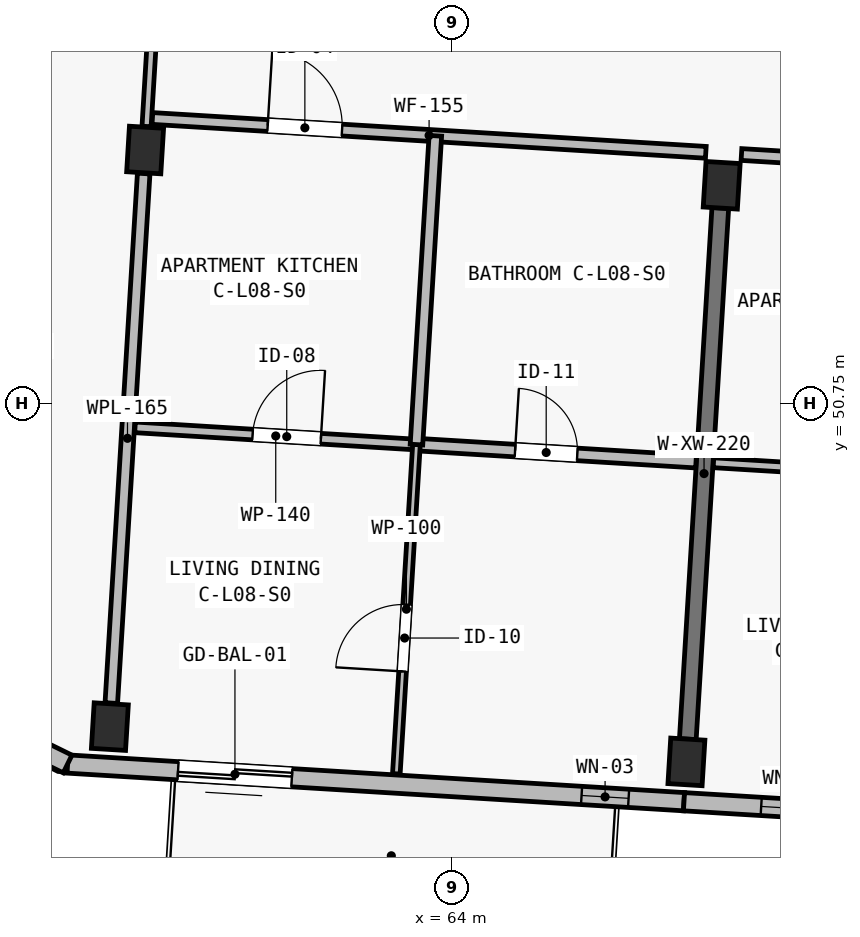
"""IFC4 building model, lengths in metres.
Left out: names, types, materials, properties, quantities, classifications, styles, units other than length and angle.
Written with IfcOpenShell. Run it as: python <this file> out.ifc"""

import sys

from ifc_helpers import new_model, si_unit, direction, frame, frame_2d, origin, origin_2d, place, context, subcontext, project, spatial, rectangle, extrude, element, fill, save


model = new_model("IFC4")
c1 = context("Model", 3, precision=1e-05, world=origin(), true_north=direction((0.0, 1.0)))
c2 = subcontext(c1, "Body", "Model", "MODEL_VIEW")
j1 = project(units=[si_unit("LENGTHUNIT", "METRE"), si_unit("PLANEANGLEUNIT", "RADIAN")], contexts=[c1])
p1 = place(None, origin())
s1 = spatial("IfcSite", under=j1, at=p1, CompositionType="ELEMENT")
p2 = place(p1, origin())
s2 = spatial("IfcBuilding", under=s1, at=p2, CompositionType="ELEMENT")
p3 = place(p2, frame((0.0, 0.0, 27.9)))
s3 = spatial("IfcBuildingStorey", under=s2, at=p3, CompositionType="ELEMENT", Elevation=27.9)
for number, where, z_axis, x_axis in (
    (1, (59.5, 46.5, 0.0), (0.0, 0.0, 1.0), (0.998, -0.061, 0.0)),
    (2, (59.964, 54.086, 0.0), (0.0, 0.0, 1.0), (0.998, -0.061, 0.0)),
    (3, (67.086, 46.036, 0.0), (0.0, 0.0, 1.0), (0.998, -0.061, 0.0)),
    (4, (67.55, 53.622, 0.0), (0.0, 0.0, 1.0), (0.998, -0.061, 0.0)),
):
    element("IfcColumn", number, at=place(p3, frame(where, z_axis=z_axis, x_axis=x_axis)), inside=s3, PredefinedType="COLUMN", context=c2, shape_type="SweptSolid", body=[
        extrude(rectangle(XDim=0.45, YDim=0.6, at=origin_2d()), origin(), (0.0, 0.0, 1.0), 3.25),
    ])
p4 = place(p3, frame((67.104, 46.335, 0.0), z_axis=(0.0, 0.0, 1.0), x_axis=(0.061034188237, 0.998135676081, 0.0)))
e5 = element("IfcWall", 5, at=p4, inside=s3, PredefinedType="SHEAR", context=c2, shape_type="SweptSolid", body=[
    extrude(rectangle(XDim=7.0, YDim=0.22, at=frame_2d((3.5, 0.0))), origin(), (0.0, 0.0, 1.0), 2.5),
])
p5 = place(p3, frame((67.054, 45.512, 0.0), z_axis=(0.0, 0.0, 1.0), x_axis=(-0.998134248939, 0.061057522844, 0.0)))
e6 = element("IfcWall", 6, at=p5, inside=s3, PredefinedType="SOLIDWALL", context=c2, shape_type="SweptSolid", body=[
    extrude(rectangle(XDim=8.125, YDim=0.24, at=frame_2d((4.062, 0.0))), origin(), (0.0, 0.0, 1.0), 3.0),
])
p6 = place(p5, frame((5.169, 0.0, 0.0)))
e7 = element("IfcOpeningElement", 7, at=p6, cuts=e6, PredefinedType="OPENING", context=c2, shape_type="SweptSolid", body=[
    extrude(rectangle(XDim=1.5, YDim=2.12, at=frame_2d((0.75, 1.06))), frame((0.0, 0.135, 0.0), z_axis=(0.0, -1.0, 0.0), x_axis=(1.0, 0.0, 0.0)), (0.0, 0.0, 1.0), 0.27),
])
p7 = place(p5, frame((0.73, 0.0, 0.5)))
e8 = element("IfcOpeningElement", 8, at=p7, cuts=e6, PredefinedType="OPENING", context=c2, shape_type="SweptSolid", body=[
    extrude(rectangle(XDim=0.62, YDim=2.28, at=frame_2d((0.31, 1.14))), frame((0.0, 0.135, 0.0), z_axis=(0.0, -1.0, 0.0), x_axis=(1.0, 0.0, 0.0)), (0.0, 0.0, 1.0), 0.27),
])
p8 = place(p3, frame((74.64, 45.048, 0.0), z_axis=(0.0, 0.0, 1.0), x_axis=(-0.998135669243, 0.061034300063, 0.0)))
e9 = element("IfcWall", 9, at=p8, inside=s3, PredefinedType="SOLIDWALL", context=c2, shape_type="SweptSolid", body=[
    extrude(rectangle(XDim=7.6, YDim=0.24, at=frame_2d((3.8, 0.0))), origin(), (0.0, 0.0, 1.0), 3.0),
])
p9 = place(p8, frame((1.189, 0.0, 0.42)))
e10 = element("IfcOpeningElement", 10, at=p9, cuts=e9, PredefinedType="OPENING", context=c2, shape_type="SweptSolid", body=[
    extrude(rectangle(XDim=0.74, YDim=2.26, at=frame_2d((0.37, 1.13))), frame((0.0, 0.135, 0.0), z_axis=(0.0, -1.0, 0.0), x_axis=(1.0, 0.0, 0.0)), (0.0, 0.0, 1.0), 0.27),
])
p10 = place(p8, frame((5.782, 0.0, 0.42)))
e11 = element("IfcOpeningElement", 11, at=p10, cuts=e9, PredefinedType="OPENING", context=c2, shape_type="SweptSolid", body=[
    extrude(rectangle(XDim=0.8, YDim=2.3, at=frame_2d((0.4, 1.15))), frame((0.0, 0.135, 0.0), z_axis=(0.0, -1.0, 0.0), x_axis=(1.0, 0.0, 0.0)), (0.0, 0.0, 1.0), 0.27),
])
p11 = place(p3, frame((58.944, 46.008, 0.0), z_axis=(0.0, 0.0, 1.0), x_axis=(-0.897775054318, 0.440454256246, 0.0)))
e12 = element("IfcWall", 12, at=p11, inside=s3, PredefinedType="SOLIDWALL", context=c2, shape_type="SweptSolid", body=[
    extrude(rectangle(XDim=8.12, YDim=0.26, at=frame_2d((4.06, 0.0))), origin(), (0.0, 0.0, 1.0), 3.0),
])
p12 = place(p11, frame((2.45, 0.0, 0.45)))
e13 = element("IfcOpeningElement", 13, at=p12, cuts=e12, PredefinedType="OPENING", context=c2, shape_type="SweptSolid", body=[
    extrude(rectangle(XDim=0.7, YDim=2.36, at=frame_2d((0.35, 1.18))), frame((0.0, 0.145, 0.0), z_axis=(0.0, -1.0, 0.0), x_axis=(1.0, 0.0, 0.0)), (0.0, 0.0, 1.0), 0.29),
])
p13 = place(p11, frame((4.83, 0.0, 0.52)))
e14 = element("IfcOpeningElement", 14, at=p13, cuts=e12, PredefinedType="OPENING", context=c2, shape_type="SweptSolid", body=[
    extrude(rectangle(XDim=0.84, YDim=2.28, at=frame_2d((0.42, 1.14))), frame((0.0, 0.145, 0.0), z_axis=(0.0, -1.0, 0.0), x_axis=(1.0, 0.0, 0.0)), (0.0, 0.0, 1.0), 0.29),
])
p14 = place(p3, frame((51.654, 49.585, 0.0), z_axis=(0.0, 0.0, 1.0), x_axis=(0.448621989068, 0.893721607059, 0.0)))
e15 = element("IfcWall", 15, at=p14, inside=s3, PredefinedType="SOLIDWALL", context=c2, shape_type="SweptSolid", body=[
    extrude(rectangle(XDim=19.061, YDim=0.26, at=frame_2d((9.53, 0.0))), origin(), (0.0, 0.0, 1.0), 3.0),
])
p15 = place(p14, frame((2.45, 0.0, 0.45)))
e16 = element("IfcOpeningElement", 16, at=p15, cuts=e15, PredefinedType="OPENING", context=c2, shape_type="SweptSolid", body=[
    extrude(rectangle(XDim=0.7, YDim=2.36, at=frame_2d((0.35, 1.18))), frame((0.0, 0.145, 0.0), z_axis=(0.0, -1.0, 0.0), x_axis=(1.0, 0.0, 0.0)), (0.0, 0.0, 1.0), 0.29),
])
p16 = place(p14, frame((15.771, 0.0, 0.52)))
e17 = element("IfcOpeningElement", 17, at=p16, cuts=e15, PredefinedType="OPENING", context=c2, shape_type="SweptSolid", body=[
    extrude(rectangle(XDim=0.84, YDim=2.28, at=frame_2d((0.42, 1.14))), frame((0.0, 0.145, 0.0), z_axis=(0.0, -1.0, 0.0), x_axis=(1.0, 0.0, 0.0)), (0.0, 0.0, 1.0), 0.29),
])
p17 = place(p3, frame((59.983, 54.395, 0.0), z_axis=(0.0, 0.0, 1.0), x_axis=(0.061035211258, 0.998135613525, 0.0)))
e18 = element("IfcWall", 18, at=p17, inside=s3, PredefinedType="PARTITIONING", context=c2, shape_type="SweptSolid", body=[
    extrude(rectangle(XDim=3.78, YDim=0.12, at=frame_2d((1.89, 0.0))), origin(), (0.0, 0.0, 1.0), 2.5),
])
p18 = place(p17, frame((1.35, 0.0, 0.0)))
e19 = element("IfcOpeningElement", 19, at=p18, cuts=e18, PredefinedType="OPENING", context=c2, shape_type="SweptSolid", body=[
    extrude(rectangle(XDim=0.88, YDim=2.1, at=frame_2d((0.44, 1.05))), frame((0.0, 0.075, 0.0), z_axis=(0.0, -1.0, 0.0), x_axis=(1.0, 0.0, 0.0)), (0.0, 0.0, 1.0), 0.15),
])
p19 = place(p3, frame((59.519, 46.809, 0.0), z_axis=(0.0, 0.0, 1.0), x_axis=(0.061034681366, 0.998135645927, 0.0)))
e20 = element("IfcWall", 20, at=p19, inside=s3, PredefinedType="PLUMBINGWALL", context=c2, shape_type="SweptSolid", body=[
    extrude(rectangle(XDim=6.98, YDim=0.165, at=frame_2d((3.49, 0.0))), origin(), (0.0, 0.0, 1.0), 2.5),
])
p20 = place(p3, frame((60.06, 54.501, 0.0), z_axis=(0.0, 0.0, 1.0), x_axis=(0.998135030865, -0.061044739012, 0.0)))
e21 = element("IfcWall", 21, at=p20, inside=s3, PredefinedType="PARTITIONING", context=c2, shape_type="SweptSolid", body=[
    extrude(rectangle(XDim=7.295, YDim=0.155, at=frame_2d((3.647, 0.0))), origin(), (0.0, 0.0, 1.0), 2.97),
])
p21 = place(p20, frame((1.52, 0.0, 0.0)))
e22 = element("IfcOpeningElement", 22, at=p21, cuts=e21, PredefinedType="OPENING", context=c2, shape_type="SweptSolid", body=[
    extrude(rectangle(XDim=0.98, YDim=2.15, at=frame_2d((0.49, 1.075))), frame((0.0, 0.093, 0.0), z_axis=(0.0, -1.0, 0.0), x_axis=(1.0, 0.0, 0.0)), (0.0, 0.0, 1.0), 0.185),
])
p22 = place(p3, frame((59.831, 50.437, 0.0), z_axis=(0.0, 0.0, 1.0), x_axis=(0.998133408508, -0.061071260176, 0.0)))
e23 = element("IfcWall", 23, at=p22, inside=s3, PredefinedType="PARTITIONING", context=c2, shape_type="SweptSolid", body=[
    extrude(rectangle(XDim=3.71, YDim=0.14, at=frame_2d((1.855, 0.0))), origin(), (0.0, 0.0, 1.0), 2.97),
])
p23 = place(p22, frame((1.55, 0.0, 0.0)))
e24 = element("IfcOpeningElement", 24, at=p23, cuts=e23, PredefinedType="OPENING", context=c2, shape_type="SweptSolid", body=[
    extrude(rectangle(XDim=0.9, YDim=2.1, at=frame_2d((0.45, 1.05))), frame((0.0, 0.085, 0.0), z_axis=(0.0, -1.0, 0.0), x_axis=(1.0, 0.0, 0.0)), (0.0, 0.0, 1.0), 0.17),
])
p24 = place(p3, frame((63.534, 50.211, 0.0), z_axis=(0.0, 0.0, 1.0), x_axis=(0.998132682596, -0.061083123148, 0.0)))
e25 = element("IfcWall", 25, at=p24, inside=s3, PredefinedType="PLUMBINGWALL", context=c2, shape_type="SweptSolid", body=[
    extrude(rectangle(XDim=3.685, YDim=0.165, at=frame_2d((1.843, 0.0))), origin(), (0.0, 0.0, 1.0), 2.97),
])
p25 = place(p24, frame((1.3, 0.0, 0.0)))
e26 = element("IfcOpeningElement", 26, at=p25, cuts=e25, PredefinedType="OPENING", context=c2, shape_type="SweptSolid", body=[
    extrude(rectangle(XDim=0.82, YDim=2.08, at=frame_2d((0.41, 1.04))), frame((0.0, 0.097, 0.0), z_axis=(0.0, -1.0, 0.0), x_axis=(1.0, 0.0, 0.0)), (0.0, 0.0, 1.0), 0.195),
])
p26 = place(p3, frame((63.269, 45.879, 0.0), z_axis=(0.0, 0.0, 1.0), x_axis=(0.06103343432, 0.998135722182, 0.0)))
e27 = element("IfcWall", 27, at=p26, inside=s3, PredefinedType="PARTITIONING", context=c2, shape_type="SweptSolid", body=[
    extrude(rectangle(XDim=4.34, YDim=0.1, at=frame_2d((2.17, 0.0))), origin(), (0.0, 0.0, 1.0), 2.97),
])
p27 = place(p26, frame((1.35, 0.0, 0.0)))
e28 = element("IfcOpeningElement", 28, at=p27, cuts=e27, PredefinedType="OPENING", context=c2, shape_type="SweptSolid", body=[
    extrude(rectangle(XDim=0.88, YDim=2.1, at=frame_2d((0.44, 1.05))), frame((0.0, 0.065, 0.0), z_axis=(0.0, -1.0, 0.0), x_axis=(1.0, 0.0, 0.0)), (0.0, 0.0, 1.0), 0.13),
])
p28 = place(p3, frame((63.534, 50.211, 0.0), z_axis=(0.0, 0.0, 1.0), x_axis=(0.061067374954, 0.99813364622, 0.0)))
e29 = element("IfcWall", 29, at=p28, inside=s3, PredefinedType="PLUMBINGWALL", context=c2, shape_type="SweptSolid", body=[
    extrude(rectangle(XDim=4.07, YDim=0.165, at=frame_2d((2.035, 0.0))), origin(), (0.0, 0.0, 1.0), 2.97),
])
p29 = place(p3, frame((67.81, 54.027, 0.0), z_axis=(0.0, 0.0, 1.0), x_axis=(0.998136655722, -0.061018165369, 0.0)))
e30 = element("IfcWall", 30, at=p29, inside=s3, PredefinedType="PARTITIONING", context=c2, shape_type="SweptSolid", body=[
    extrude(rectangle(XDim=7.13, YDim=0.155, at=frame_2d((3.565, 0.0))), origin(), (0.0, 0.0, 1.0), 2.97),
])
p30 = place(p29, frame((1.355, 0.0, 0.0)))
e31 = element("IfcOpeningElement", 31, at=p30, cuts=e30, PredefinedType="OPENING", context=c2, shape_type="SweptSolid", body=[
    extrude(rectangle(XDim=1.02, YDim=2.2, at=frame_2d((0.51, 1.1))), frame((0.0, 0.093, 0.0), z_axis=(0.0, -1.0, 0.0), x_axis=(1.0, 0.0, 0.0)), (0.0, 0.0, 1.0), 0.185),
])
p31 = place(p3, frame((67.442, 49.972, 0.0), z_axis=(0.0, 0.0, 1.0), x_axis=(0.998132682596, -0.061083123148, 0.0)))
e32 = element("IfcWall", 32, at=p31, inside=s3, PredefinedType="PARTITIONING", context=c2, shape_type="SweptSolid", body=[
    extrude(rectangle(XDim=3.685, YDim=0.13, at=frame_2d((1.843, 0.0))), origin(), (0.0, 0.0, 1.0), 2.97),
])
p32 = place(p31, frame((1.525, 0.0, 0.0)))
e33 = element("IfcOpeningElement", 33, at=p32, cuts=e32, PredefinedType="OPENING", context=c2, shape_type="SweptSolid", body=[
    extrude(rectangle(XDim=0.88, YDim=2.1, at=frame_2d((0.44, 1.05))), frame((0.0, 0.08, 0.0), z_axis=(0.0, -1.0, 0.0), x_axis=(1.0, 0.0, 0.0)), (0.0, 0.0, 1.0), 0.16),
])
p33 = place(p6, origin())
e34 = element("IfcDoor", 34, at=p33, inside=s3, OperationType="SLIDING_TO_RIGHT", PredefinedType="DOOR", context=c2, shape_type="SweptSolid", body=[
    extrude(rectangle(XDim=1.5, YDim=2.12, at=frame_2d((0.75, 1.06))), frame((0.0, 0.025, 0.0), z_axis=(0.0, -1.0, 0.0), x_axis=(1.0, 0.0, 0.0)), (0.0, 0.0, 1.0), 0.05),
])
fill(e7, e34)
p34 = place(p7, origin())
e35 = element("IfcWindow", 35, at=p34, inside=s3, PartitioningType="SINGLE_PANEL", PredefinedType="WINDOW", context=c2, shape_type="SweptSolid", body=[
    extrude(rectangle(XDim=0.62, YDim=2.28, at=frame_2d((0.31, 1.14))), frame((0.0, 0.03, 0.0), z_axis=(0.0, -1.0, 0.0), x_axis=(1.0, 0.0, 0.0)), (0.0, 0.0, 1.0), 0.06),
])
fill(e8, e35)
p35 = place(p10, origin())
e36 = element("IfcWindow", 36, at=p35, inside=s3, PartitioningType="SINGLE_PANEL", PredefinedType="WINDOW", context=c2, shape_type="SweptSolid", body=[
    extrude(rectangle(XDim=0.8, YDim=2.3, at=frame_2d((0.4, 1.15))), frame((0.0, 0.03, 0.0), z_axis=(0.0, -1.0, 0.0), x_axis=(1.0, 0.0, 0.0)), (0.0, 0.0, 1.0), 0.06),
])
fill(e11, e36)
p36 = place(p21, origin())
e37 = element("IfcDoor", 37, at=p36, inside=s3, OperationType="SINGLE_SWING_LEFT", PredefinedType="DOOR", context=c2, shape_type="SweptSolid", body=[
    extrude(rectangle(XDim=0.98, YDim=2.15, at=frame_2d((0.49, 1.075))), frame((0.0, 0.025, 0.0), z_axis=(0.0, -1.0, 0.0), x_axis=(1.0, 0.0, 0.0)), (0.0, 0.0, 1.0), 0.05),
])
fill(e22, e37)
p37 = place(p23, origin())
e38 = element("IfcDoor", 38, at=p37, inside=s3, OperationType="SINGLE_SWING_RIGHT", PredefinedType="DOOR", context=c2, shape_type="SweptSolid", body=[
    extrude(rectangle(XDim=0.9, YDim=2.1, at=frame_2d((0.45, 1.05))), frame((0.0, 0.025, 0.0), z_axis=(0.0, -1.0, 0.0), x_axis=(1.0, 0.0, 0.0)), (0.0, 0.0, 1.0), 0.05),
])
fill(e24, e38)
p38 = place(p25, origin())
e39 = element("IfcDoor", 39, at=p38, inside=s3, OperationType="SINGLE_SWING_LEFT", PredefinedType="DOOR", context=c2, shape_type="SweptSolid", body=[
    extrude(rectangle(XDim=0.82, YDim=2.08, at=frame_2d((0.41, 1.04))), frame((0.0, 0.025, 0.0), z_axis=(0.0, -1.0, 0.0), x_axis=(1.0, 0.0, 0.0)), (0.0, 0.0, 1.0), 0.05),
])
fill(e26, e39)
p39 = place(p27, origin())
e40 = element("IfcDoor", 40, at=p39, inside=s3, OperationType="SINGLE_SWING_LEFT", PredefinedType="DOOR", context=c2, shape_type="SweptSolid", body=[
    extrude(rectangle(XDim=0.88, YDim=2.1, at=frame_2d((0.44, 1.05))), frame((0.0, 0.025, 0.0), z_axis=(0.0, -1.0, 0.0), x_axis=(1.0, 0.0, 0.0)), (0.0, 0.0, 1.0), 0.05),
])
fill(e28, e40)
save(model, sys.argv[1])
